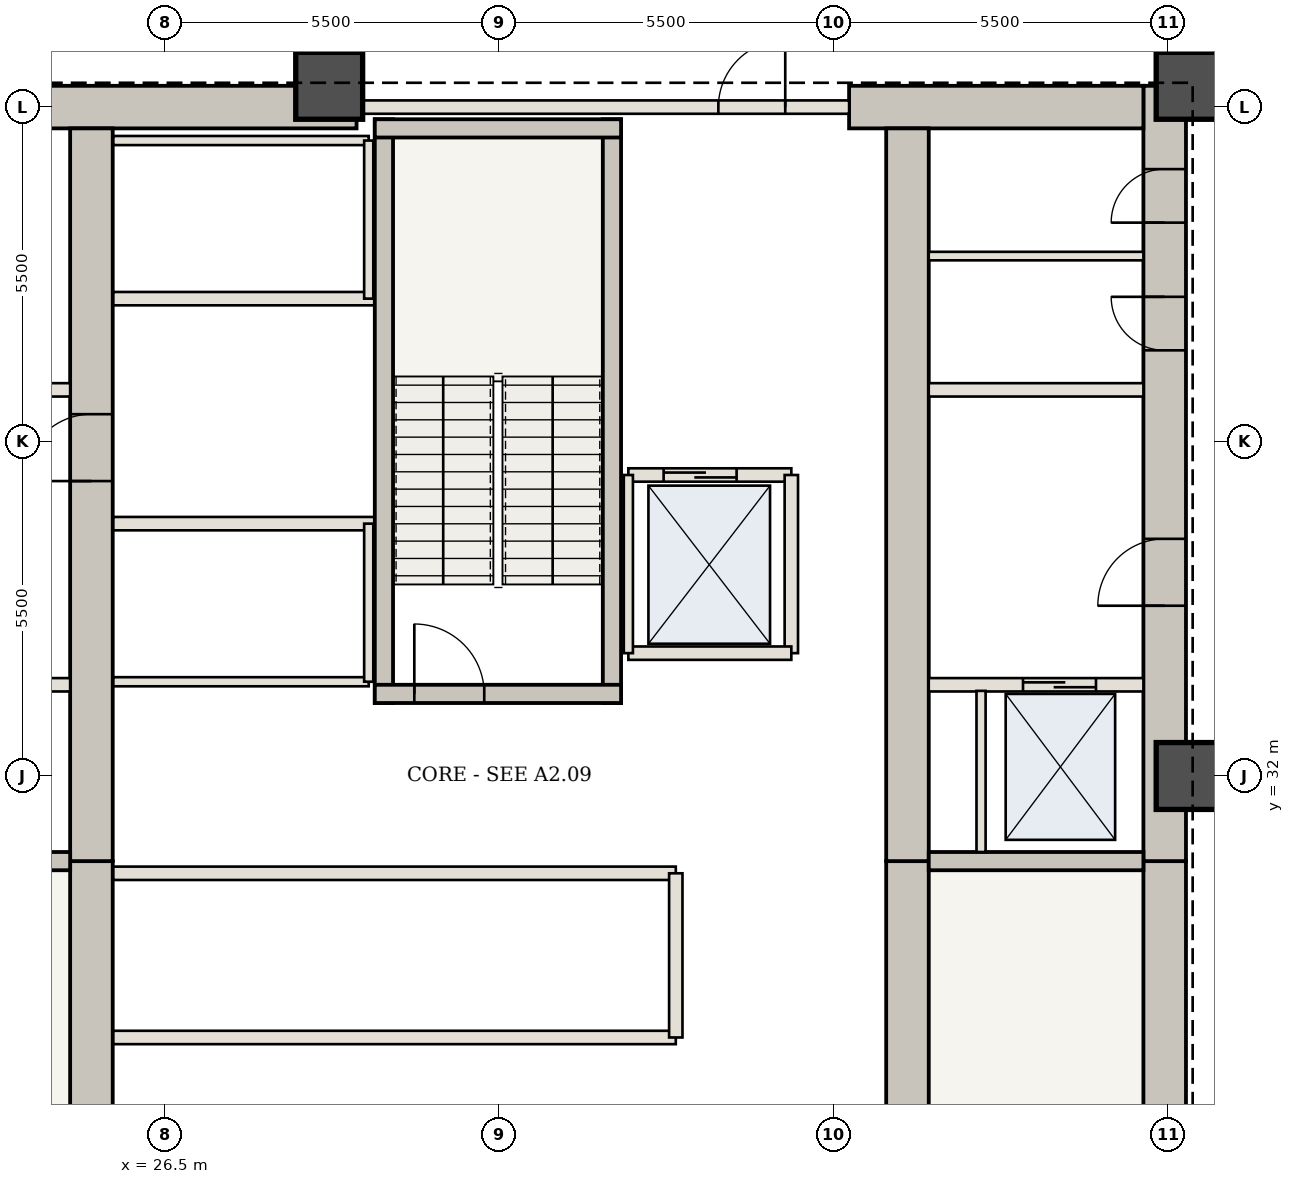
"""IFC4 building model, lengths in metres.
Left out: names, types, materials, properties, quantities, classifications, styles, units other than length and angle.
Written with IfcOpenShell. Run it as: python <this file> out.ifc"""

import sys

from ifc_helpers import new_model, si_unit, direction, frame, frame_2d, origin, origin_2d, place, context, subcontext, project, spatial, rectangle, extrude, element, fill, save


model = new_model("IFC4")
c1 = context("Model", 3, precision=1e-05, world=origin(), true_north=direction((0.0, 1.0)))
c2 = subcontext(c1, "Body", "Model", "MODEL_VIEW")
j1 = project(units=[si_unit("LENGTHUNIT", "METRE"), si_unit("PLANEANGLEUNIT", "RADIAN")], contexts=[c1])
p1 = place(None, origin())
s1 = spatial("IfcSite", under=j1, at=p1, CompositionType="ELEMENT")
p2 = place(p1, origin())
s2 = spatial("IfcBuilding", under=s1, at=p2, CompositionType="ELEMENT")
p3 = place(p2, frame((0.0, 0.0, 34.3)))
s3 = spatial("IfcBuildingStorey", under=s2, at=p3, CompositionType="ELEMENT", Elevation=34.3)
p4 = place(p3, frame((42.94, 20.6, 0.0), z_axis=(0.0, 0.0, 1.0), x_axis=(0.0, 1.0, 0.0)))
e1 = element("IfcWall", 1, at=p4, inside=s3, PredefinedType="SHEAR", context=c2, shape_type="SweptSolid", body=[
    extrude(rectangle(XDim=10.0, YDim=0.7, at=frame_2d((5.0, 0.0))), origin(), (0.0, 0.0, 1.0), 4.55),
])
p5 = place(p4, frame((1.15, 0.0, 0.0)))
e2 = element("IfcOpeningElement", 2, at=p5, cuts=e1, PredefinedType="OPENING", context=c2, shape_type="SweptSolid", body=[
    extrude(rectangle(XDim=1.15, YDim=2.15, at=frame_2d((0.575, 1.075))), frame((0.0, 0.36, 0.0), z_axis=(0.0, -1.0, 0.0), x_axis=(1.0, 0.0, 0.0)), (0.0, 0.0, 1.0), 0.72),
])
p6 = place(p3, frame((42.94, 30.6, 0.0), z_axis=(0.0, 0.0, 1.0), x_axis=(0.0, 1.0, 0.0)))
e3 = element("IfcWall", 3, at=p6, inside=s3, PredefinedType="SHEAR", context=c2, shape_type="SweptSolid", body=[
    extrude(rectangle(XDim=12.75, YDim=0.7, at=frame_2d((6.375, 0.0))), origin(), (0.0, 0.0, 1.0), 4.55),
])
p7 = place(p6, frame((4.2, 0.0, 0.0)))
e4 = element("IfcOpeningElement", 4, at=p7, cuts=e3, PredefinedType="OPENING", context=c2, shape_type="SweptSolid", body=[
    extrude(rectangle(XDim=1.1, YDim=2.15, at=frame_2d((0.55, 1.075))), frame((0.0, 0.36, 0.0), z_axis=(0.0, -1.0, 0.0), x_axis=(1.0, 0.0, 0.0)), (0.0, 0.0, 1.0), 0.72),
])
p8 = place(p6, frame((8.4, 0.0, 0.0)))
e5 = element("IfcOpeningElement", 5, at=p8, cuts=e3, PredefinedType="OPENING", context=c2, shape_type="SweptSolid", body=[
    extrude(rectangle(XDim=0.88, YDim=2.1, at=frame_2d((0.44, 1.05))), frame((0.0, 0.36, 0.0), z_axis=(0.0, -1.0, 0.0), x_axis=(1.0, 0.0, 0.0)), (0.0, 0.0, 1.0), 0.72),
])
p9 = place(p6, frame((10.5, 0.0, 0.0)))
e6 = element("IfcOpeningElement", 6, at=p9, cuts=e3, PredefinedType="OPENING", context=c2, shape_type="SweptSolid", body=[
    extrude(rectangle(XDim=0.88, YDim=2.1, at=frame_2d((0.44, 1.05))), frame((0.0, 0.36, 0.0), z_axis=(0.0, -1.0, 0.0), x_axis=(1.0, 0.0, 0.0)), (0.0, 0.0, 1.0), 0.72),
])
p10 = place(p3, frame((21.41, 43.0, 0.0), z_axis=(0.0, 0.0, 1.0), x_axis=(1.0, 0.0, 0.0)))
e7 = element("IfcWall", 7, at=p10, inside=s3, PredefinedType="SHEAR", context=c2, shape_type="SweptSolid", body=[
    extrude(rectangle(XDim=8.24, YDim=0.7, at=frame_2d((4.12, 0.0))), origin(), (0.0, 0.0, 1.0), 4.55),
])
p11 = place(p3, frame((37.75, 43.0, 0.0), z_axis=(0.0, 0.0, 1.0), x_axis=(1.0, 0.0, 0.0)))
e8 = element("IfcWall", 8, at=p11, inside=s3, PredefinedType="SHEAR", context=c2, shape_type="SweptSolid", body=[
    extrude(rectangle(XDim=4.84, YDim=0.7, at=frame_2d((2.42, 0.0))), origin(), (0.0, 0.0, 1.0), 4.55),
])
p12 = place(p3, frame((25.29, 21.3, 0.0), z_axis=(0.0, 0.0, 1.0), x_axis=(0.0, 1.0, 0.0)))
e9 = element("IfcWall", 9, at=p12, inside=s3, PredefinedType="SHEAR", context=c2, shape_type="SweptSolid", body=[
    extrude(rectangle(XDim=9.3, YDim=0.7, at=frame_2d((4.65, 0.0))), origin(), (0.0, 0.0, 1.0), 4.55),
])
p13 = place(p3, frame((25.29, 30.6, 0.0), z_axis=(0.0, 0.0, 1.0), x_axis=(0.0, 1.0, 0.0)))
e10 = element("IfcWall", 10, at=p13, inside=s3, PredefinedType="SHEAR", context=c2, shape_type="SweptSolid", body=[
    extrude(rectangle(XDim=12.05, YDim=0.7, at=frame_2d((6.025, 0.0))), origin(), (0.0, 0.0, 1.0), 4.55),
])
p14 = place(p13, frame((6.25, 0.0, 0.0)))
e11 = element("IfcOpeningElement", 11, at=p14, cuts=e10, PredefinedType="OPENING", context=c2, shape_type="SweptSolid", body=[
    extrude(rectangle(XDim=1.1, YDim=2.15, at=frame_2d((0.55, 1.075))), frame((0.0, 0.36, 0.0), z_axis=(0.0, -1.0, 0.0), x_axis=(1.0, 0.0, 0.0)), (0.0, 0.0, 1.0), 0.72),
])
p15 = place(p3, frame((38.71, 21.3, 0.0), z_axis=(0.0, 0.0, 1.0), x_axis=(0.0, 1.0, 0.0)))
e12 = element("IfcWall", 12, at=p15, inside=s3, PredefinedType="SHEAR", context=c2, shape_type="SweptSolid", body=[
    extrude(rectangle(XDim=9.3, YDim=0.7, at=frame_2d((4.65, 0.0))), origin(), (0.0, 0.0, 1.0), 4.55),
])
p16 = place(p3, frame((38.71, 30.6, 0.0), z_axis=(0.0, 0.0, 1.0), x_axis=(0.0, 1.0, 0.0)))
e13 = element("IfcWall", 13, at=p16, inside=s3, PredefinedType="SHEAR", context=c2, shape_type="SweptSolid", body=[
    extrude(rectangle(XDim=12.05, YDim=0.7, at=frame_2d((6.025, 0.0))), origin(), (0.0, 0.0, 1.0), 4.55),
])
for number, where, z_axis, x_axis in (
    (14, (43.35, 32.0, 0.0), (0.0, 0.0, 1.0), (1.0, 0.0, 0.0)),
    (15, (43.35, 43.35, 0.0), (0.0, 0.0, 1.0), (1.0, 0.0, 0.0)),
    (16, (29.2, 43.35, 0.0), (0.0, 0.0, 1.0), (1.0, 0.0, 0.0)),
):
    element("IfcColumn", number, at=place(p3, frame(where, z_axis=z_axis, x_axis=x_axis)), inside=s3, PredefinedType="COLUMN", context=c2, shape_type="SweptSolid", body=[
        extrude(rectangle(XDim=1.1, YDim=1.1, at=origin_2d()), origin(), (0.0, 0.0, 1.0), 4.55),
    ])
for number, where, z_axis, x_axis in (
    (17, (21.41, 30.6, 0.0), (0.0, 0.0, 1.0), (1.0, 0.0, 0.0)),
    (18, (39.06, 30.6, 0.0), (0.0, 0.0, 1.0), (1.0, 0.0, 0.0)),
):
    element("IfcWall", number, at=place(p3, frame(where, z_axis=z_axis, x_axis=x_axis)), inside=s3, PredefinedType="SHEAR", context=c2, shape_type="SweptSolid", body=[
        extrude(rectangle(XDim=3.53, YDim=0.3, at=frame_2d((1.765, 0.0))), origin(), (0.0, 0.0, 1.0), 4.13),
    ])
p17 = place(p3, frame((21.41, 33.5, 0.0), z_axis=(0.0, 0.0, 1.0), x_axis=(1.0, 0.0, 0.0)))
e19 = element("IfcWall", 19, at=p17, inside=s3, PredefinedType="STANDARD", context=c2, shape_type="SweptSolid", body=[
    extrude(rectangle(XDim=3.53, YDim=0.22, at=frame_2d((1.765, 0.0))), origin(), (0.0, 0.0, 1.0), 4.13),
])
p18 = place(p17, frame((0.75, 0.0, 0.0)))
e20 = element("IfcOpeningElement", 20, at=p18, cuts=e19, PredefinedType="OPENING", context=c2, shape_type="SweptSolid", body=[
    extrude(rectangle(XDim=1.2, YDim=2.2, at=frame_2d((0.6, 1.1))), frame((0.0, 0.12, 0.0), z_axis=(0.0, -1.0, 0.0), x_axis=(1.0, 0.0, 0.0)), (0.0, 0.0, 1.0), 0.24),
])
p19 = place(p3, frame((39.06, 33.5, 0.0), z_axis=(0.0, 0.0, 1.0), x_axis=(1.0, 0.0, 0.0)))
e21 = element("IfcWall", 21, at=p19, inside=s3, PredefinedType="STANDARD", context=c2, shape_type="SweptSolid", body=[
    extrude(rectangle(XDim=3.53, YDim=0.22, at=frame_2d((1.765, 0.0))), origin(), (0.0, 0.0, 1.0), 4.13),
])
p20 = place(p19, frame((1.55, 0.0, 0.0)))
e22 = element("IfcOpeningElement", 22, at=p20, cuts=e21, PredefinedType="OPENING", context=c2, shape_type="SweptSolid", body=[
    extrude(rectangle(XDim=1.2, YDim=2.2, at=frame_2d((0.6, 1.1))), frame((0.0, 0.12, 0.0), z_axis=(0.0, -1.0, 0.0), x_axis=(1.0, 0.0, 0.0)), (0.0, 0.0, 1.0), 0.24),
])
p21 = place(p3, frame((39.92, 30.75, 0.0), z_axis=(0.0, 0.0, 1.0), x_axis=(0.0, 1.0, 0.0)))
e23 = element("IfcWall", 23, at=p21, inside=s3, PredefinedType="STANDARD", context=c2, shape_type="SweptSolid", body=[
    extrude(rectangle(XDim=2.65, YDim=0.15, at=frame_2d((1.325, 0.0))), origin(), (0.0, 0.0, 1.0), 4.13),
])
for number, where, z_axis, x_axis in (
    (24, (21.41, 38.35, 0.0), (0.0, 0.0, 1.0), (1.0, 0.0, 0.0)),
    (25, (39.06, 38.35, 0.0), (0.0, 0.0, 1.0), (1.0, 0.0, 0.0)),
):
    element("IfcWall", number, at=place(p3, frame(where, z_axis=z_axis, x_axis=x_axis)), inside=s3, PredefinedType="STANDARD", context=c2, shape_type="SweptSolid", body=[
        extrude(rectangle(XDim=3.53, YDim=0.22, at=frame_2d((1.765, 0.0))), origin(), (0.0, 0.0, 1.0), 4.13),
    ])
p22 = place(p3, frame((39.06, 40.55, 0.0), z_axis=(0.0, 0.0, 1.0), x_axis=(1.0, 0.0, 0.0)))
e26 = element("IfcWall", 26, at=p22, inside=s3, PredefinedType="STANDARD", context=c2, shape_type="SweptSolid", body=[
    extrude(rectangle(XDim=3.53, YDim=0.14, at=frame_2d((1.765, 0.0))), origin(), (0.0, 0.0, 1.0), 4.13),
])
for number, where, z_axis, x_axis in (
    (27, (25.65, 27.7, 0.0), (0.0, 0.0, 1.0), (1.0, 0.0, 0.0)),
    (28, (25.65, 30.4, 0.0), (0.0, 0.0, 1.0), (1.0, 0.0, 0.0)),
):
    element("IfcWall", number, at=place(p3, frame(where, z_axis=z_axis, x_axis=x_axis)), inside=s3, PredefinedType="STANDARD", context=c2, shape_type="SweptSolid", body=[
        extrude(rectangle(XDim=9.25, YDim=0.22, at=frame_2d((4.625, 0.0))), origin(), (0.0, 0.0, 1.0), 4.13),
    ])
p23 = place(p3, frame((34.9, 27.7, 0.0), z_axis=(0.0, 0.0, 1.0), x_axis=(0.0, 1.0, 0.0)))
e29 = element("IfcWall", 29, at=p23, inside=s3, PredefinedType="STANDARD", context=c2, shape_type="SweptSolid", body=[
    extrude(rectangle(XDim=2.7, YDim=0.22, at=frame_2d((1.35, 0.0))), origin(), (0.0, 0.0, 1.0), 4.13),
])
p24 = place(p3, frame((25.65, 36.15, 0.0), z_axis=(0.0, 0.0, 1.0), x_axis=(1.0, 0.0, 0.0)))
e30 = element("IfcWall", 30, at=p24, inside=s3, PredefinedType="STANDARD", context=c2, shape_type="SweptSolid", body=[
    extrude(rectangle(XDim=4.3, YDim=0.22, at=frame_2d((2.15, 0.0))), origin(), (0.0, 0.0, 1.0), 4.13),
])
p25 = place(p3, frame((25.65, 33.55, 0.0), z_axis=(0.0, 0.0, 1.0), x_axis=(1.0, 0.0, 0.0)))
e31 = element("IfcWall", 31, at=p25, inside=s3, PredefinedType="STANDARD", context=c2, shape_type="SweptSolid", body=[
    extrude(rectangle(XDim=4.2, YDim=0.15, at=frame_2d((2.1, 0.0))), origin(), (0.0, 0.0, 1.0), 4.13),
])
p26 = place(p3, frame((29.85, 33.55, 0.0), z_axis=(0.0, 0.0, 1.0), x_axis=(0.0, 1.0, 0.0)))
e32 = element("IfcWall", 32, at=p26, inside=s3, PredefinedType="STANDARD", context=c2, shape_type="SweptSolid", body=[
    extrude(rectangle(XDim=2.6, YDim=0.15, at=frame_2d((1.3, 0.0))), origin(), (0.0, 0.0, 1.0), 4.13),
])
p27 = place(p3, frame((25.65, 39.85, 0.0), z_axis=(0.0, 0.0, 1.0), x_axis=(1.0, 0.0, 0.0)))
e33 = element("IfcWall", 33, at=p27, inside=s3, PredefinedType="STANDARD", context=c2, shape_type="SweptSolid", body=[
    extrude(rectangle(XDim=4.3, YDim=0.22, at=frame_2d((2.15, 0.0))), origin(), (0.0, 0.0, 1.0), 4.13),
])
p28 = place(p3, frame((25.65, 42.45, 0.0), z_axis=(0.0, 0.0, 1.0), x_axis=(1.0, 0.0, 0.0)))
e34 = element("IfcWall", 34, at=p28, inside=s3, PredefinedType="STANDARD", context=c2, shape_type="SweptSolid", body=[
    extrude(rectangle(XDim=4.2, YDim=0.15, at=frame_2d((2.1, 0.0))), origin(), (0.0, 0.0, 1.0), 4.13),
])
p29 = place(p3, frame((29.85, 39.85, 0.0), z_axis=(0.0, 0.0, 1.0), x_axis=(0.0, 1.0, 0.0)))
e35 = element("IfcWall", 35, at=p29, inside=s3, PredefinedType="STANDARD", context=c2, shape_type="SweptSolid", body=[
    extrude(rectangle(XDim=2.6, YDim=0.15, at=frame_2d((1.3, 0.0))), origin(), (0.0, 0.0, 1.0), 4.13),
])
for number, where, z_axis, x_axis in (
    (36, (30.1, 33.2, 0.0), (0.0, 0.0, 1.0), (0.0, 1.0, 0.0)),
    (37, (33.85, 33.2, 0.0), (0.0, 0.0, 1.0), (0.0, 1.0, 0.0)),
):
    element("IfcWall", number, at=place(p3, frame(where, z_axis=z_axis, x_axis=x_axis)), inside=s3, PredefinedType="SHEAR", context=c2, shape_type="SweptSolid", body=[
        extrude(rectangle(XDim=9.6, YDim=0.3, at=frame_2d((4.8, 0.0))), origin(), (0.0, 0.0, 1.0), 4.13),
    ])
p30 = place(p3, frame((29.95, 33.35, 0.0), z_axis=(0.0, 0.0, 1.0), x_axis=(1.0, 0.0, 0.0)))
e38 = element("IfcWall", 38, at=p30, inside=s3, PredefinedType="SHEAR", context=c2, shape_type="SweptSolid", body=[
    extrude(rectangle(XDim=4.05, YDim=0.3, at=frame_2d((2.025, 0.0))), origin(), (0.0, 0.0, 1.0), 4.13),
])
p31 = place(p30, frame((0.65, 0.0, 0.0)))
e39 = element("IfcOpeningElement", 39, at=p31, cuts=e38, PredefinedType="OPENING", context=c2, shape_type="SweptSolid", body=[
    extrude(rectangle(XDim=1.15, YDim=2.15, at=frame_2d((0.575, 1.075))), frame((0.0, 0.16, 0.0), z_axis=(0.0, -1.0, 0.0), x_axis=(1.0, 0.0, 0.0)), (0.0, 0.0, 1.0), 0.32),
])
p32 = place(p3, frame((29.95, 42.65, 0.0), z_axis=(0.0, 0.0, 1.0), x_axis=(1.0, 0.0, 0.0)))
e40 = element("IfcWall", 40, at=p32, inside=s3, PredefinedType="SHEAR", context=c2, shape_type="SweptSolid", body=[
    extrude(rectangle(XDim=4.05, YDim=0.3, at=frame_2d((2.025, 0.0))), origin(), (0.0, 0.0, 1.0), 4.13),
])
p33 = place(p3, frame((29.65, 43.0, 0.0), z_axis=(0.0, 0.0, 1.0), x_axis=(1.0, 0.0, 0.0)))
e41 = element("IfcWall", 41, at=p33, inside=s3, PredefinedType="STANDARD", context=c2, shape_type="SweptSolid", body=[
    extrude(rectangle(XDim=8.1, YDim=0.22, at=frame_2d((4.05, 0.0))), origin(), (0.0, 0.0, 1.0), 4.13),
])
p34 = place(p33, frame((5.95, 0.0, 0.0)))
e42 = element("IfcOpeningElement", 42, at=p34, cuts=e41, PredefinedType="OPENING", context=c2, shape_type="SweptSolid", body=[
    extrude(rectangle(XDim=1.1, YDim=2.15, at=frame_2d((0.55, 1.075))), frame((0.0, 0.12, 0.0), z_axis=(0.0, -1.0, 0.0), x_axis=(1.0, 0.0, 0.0)), (0.0, 0.0, 1.0), 0.24),
])
p35 = place(p3, frame((34.12, 36.95, 0.0), z_axis=(0.0, 0.0, 1.0), x_axis=(1.0, 0.0, 0.0)))
e43 = element("IfcWall", 43, at=p35, inside=s3, PredefinedType="STANDARD", context=c2, shape_type="SweptSolid", body=[
    extrude(rectangle(XDim=2.68, YDim=0.22, at=frame_2d((1.34, 0.0))), origin(), (0.0, 0.0, 1.0), 4.13),
])
p36 = place(p35, frame((0.58, 0.0, 0.0)))
e44 = element("IfcOpeningElement", 44, at=p36, cuts=e43, PredefinedType="OPENING", context=c2, shape_type="SweptSolid", body=[
    extrude(rectangle(XDim=1.2, YDim=2.2, at=frame_2d((0.6, 1.1))), frame((0.0, 0.12, 0.0), z_axis=(0.0, -1.0, 0.0), x_axis=(1.0, 0.0, 0.0)), (0.0, 0.0, 1.0), 0.24),
])
p37 = place(p3, frame((36.8, 34.02, 0.0), z_axis=(0.0, 0.0, 1.0), x_axis=(0.0, 1.0, 0.0)))
e45 = element("IfcWall", 45, at=p37, inside=s3, PredefinedType="STANDARD", context=c2, shape_type="SweptSolid", body=[
    extrude(rectangle(XDim=2.93, YDim=0.22, at=frame_2d((1.465, 0.0))), origin(), (0.0, 0.0, 1.0), 4.13),
])
p38 = place(p3, frame((34.12, 34.02, 0.0), z_axis=(0.0, 0.0, 1.0), x_axis=(1.0, 0.0, 0.0)))
e46 = element("IfcWall", 46, at=p38, inside=s3, PredefinedType="STANDARD", context=c2, shape_type="SweptSolid", body=[
    extrude(rectangle(XDim=2.68, YDim=0.22, at=frame_2d((1.34, 0.0))), origin(), (0.0, 0.0, 1.0), 4.13),
])
p39 = place(p3, frame((34.12, 34.02, 0.0), z_axis=(0.0, 0.0, 1.0), x_axis=(0.0, 1.0, 0.0)))
e47 = element("IfcWall", 47, at=p39, inside=s3, PredefinedType="STANDARD", context=c2, shape_type="SweptSolid", body=[
    extrude(rectangle(XDim=2.93, YDim=0.15, at=frame_2d((1.465, 0.0))), origin(), (0.0, 0.0, 1.0), 4.13),
])
p40 = place(p7, origin())
e48 = element("IfcDoor", 48, at=p40, inside=s3, OperationType="SINGLE_SWING_LEFT", PredefinedType="DOOR", context=c2, shape_type="SweptSolid", body=[
    extrude(rectangle(XDim=1.1, YDim=2.15, at=frame_2d((0.55, 1.075))), frame((0.0, 0.025, 0.0), z_axis=(0.0, -1.0, 0.0), x_axis=(1.0, 0.0, 0.0)), (0.0, 0.0, 1.0), 0.05),
])
fill(e4, e48)
p41 = place(p14, origin())
e49 = element("IfcDoor", 49, at=p41, inside=s3, OperationType="SINGLE_SWING_LEFT", PredefinedType="DOOR", context=c2, shape_type="SweptSolid", body=[
    extrude(rectangle(XDim=1.1, YDim=2.15, at=frame_2d((0.55, 1.075))), frame((0.0, 0.025, 0.0), z_axis=(0.0, -1.0, 0.0), x_axis=(1.0, 0.0, 0.0)), (0.0, 0.0, 1.0), 0.05),
])
fill(e11, e49)
p42 = place(p8, origin())
e50 = element("IfcDoor", 50, at=p42, inside=s3, OperationType="SINGLE_SWING_RIGHT", PredefinedType="DOOR", context=c2, shape_type="SweptSolid", body=[
    extrude(rectangle(XDim=0.88, YDim=2.1, at=frame_2d((0.44, 1.05))), frame((0.0, 0.025, 0.0), z_axis=(0.0, -1.0, 0.0), x_axis=(1.0, 0.0, 0.0)), (0.0, 0.0, 1.0), 0.05),
])
fill(e5, e50)
p43 = place(p9, origin())
e51 = element("IfcDoor", 51, at=p43, inside=s3, OperationType="SINGLE_SWING_LEFT", PredefinedType="DOOR", context=c2, shape_type="SweptSolid", body=[
    extrude(rectangle(XDim=0.88, YDim=2.1, at=frame_2d((0.44, 1.05))), frame((0.0, 0.025, 0.0), z_axis=(0.0, -1.0, 0.0), x_axis=(1.0, 0.0, 0.0)), (0.0, 0.0, 1.0), 0.05),
])
fill(e6, e51)
p44 = place(p20, origin())
e52 = element("IfcDoor", 52, at=p44, inside=s3, OperationType="DOUBLE_DOOR_SLIDING", PredefinedType="DOOR", context=c2, shape_type="SweptSolid", body=[
    extrude(rectangle(XDim=1.2, YDim=2.2, at=frame_2d((0.6, 1.1))), frame((0.0, 0.025, 0.0), z_axis=(0.0, -1.0, 0.0), x_axis=(1.0, 0.0, 0.0)), (0.0, 0.0, 1.0), 0.05),
])
fill(e22, e52)
p45 = place(p31, origin())
e53 = element("IfcDoor", 53, at=p45, inside=s3, OperationType="SINGLE_SWING_LEFT", PredefinedType="DOOR", context=c2, shape_type="SweptSolid", body=[
    extrude(rectangle(XDim=1.15, YDim=2.15, at=frame_2d((0.575, 1.075))), frame((0.0, 0.025, 0.0), z_axis=(0.0, -1.0, 0.0), x_axis=(1.0, 0.0, 0.0)), (0.0, 0.0, 1.0), 0.05),
])
fill(e39, e53)
p46 = place(p34, origin())
e54 = element("IfcDoor", 54, at=p46, inside=s3, OperationType="SINGLE_SWING_RIGHT", PredefinedType="DOOR", context=c2, shape_type="SweptSolid", body=[
    extrude(rectangle(XDim=1.1, YDim=2.15, at=frame_2d((0.55, 1.075))), frame((0.0, 0.025, 0.0), z_axis=(0.0, -1.0, 0.0), x_axis=(1.0, 0.0, 0.0)), (0.0, 0.0, 1.0), 0.05),
])
fill(e42, e54)
p47 = place(p36, origin())
e55 = element("IfcDoor", 55, at=p47, inside=s3, OperationType="DOUBLE_DOOR_SLIDING", PredefinedType="DOOR", context=c2, shape_type="SweptSolid", body=[
    extrude(rectangle(XDim=1.2, YDim=2.2, at=frame_2d((0.6, 1.1))), frame((0.0, 0.025, 0.0), z_axis=(0.0, -1.0, 0.0), x_axis=(1.0, 0.0, 0.0)), (0.0, 0.0, 1.0), 0.05),
])
fill(e44, e55)
save(model, sys.argv[1])
